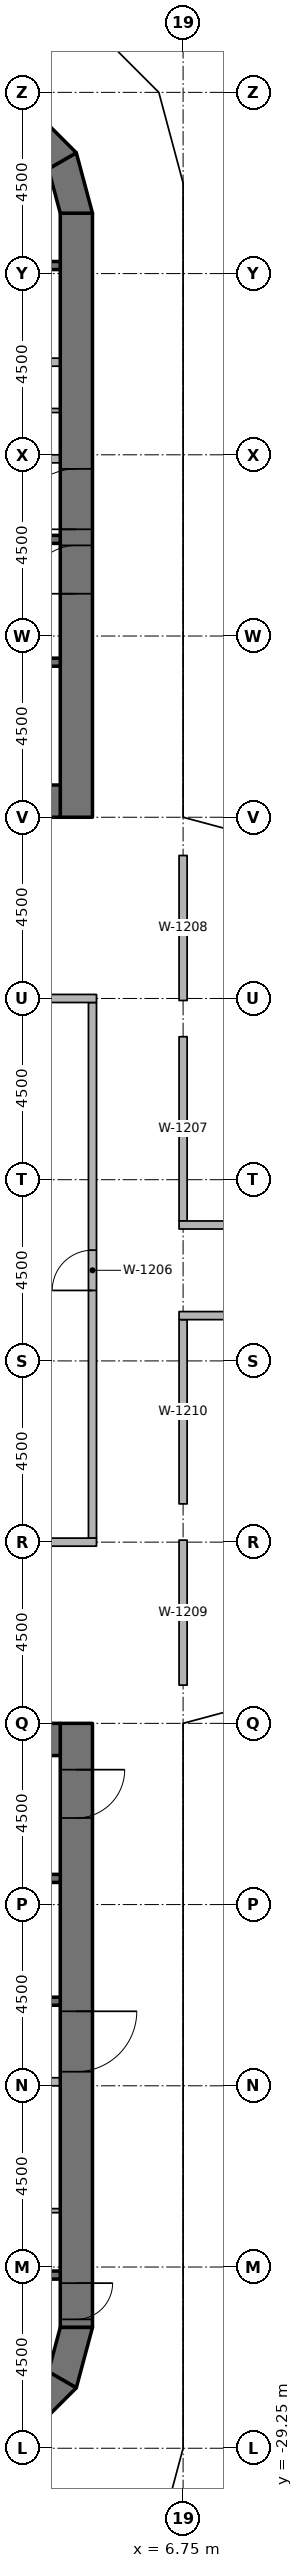
"""IFC4 building model, lengths in metres.
Left out: names, types, materials, properties, quantities, classifications, styles, units other than length and angle.
Written with IfcOpenShell. Run it as: python <this file> out.ifc"""

import sys

from ifc_helpers import new_model, si_unit, direction, frame, frame_2d, origin, origin_2d, place, context, subcontext, project, spatial, polyline, rectangle, outline, extrude, element, fill, save


model = new_model("IFC4")
c1 = context("Model", 3, precision=1e-05, world=origin(), true_north=direction((0.0, 1.0)))
c2 = subcontext(c1, "Body", "Model", "MODEL_VIEW")
j1 = project(units=[si_unit("LENGTHUNIT", "METRE"), si_unit("PLANEANGLEUNIT", "RADIAN")], contexts=[c1])
p1 = place(None, origin())
s1 = spatial("IfcSite", under=j1, at=p1, CompositionType="ELEMENT")
p2 = place(p1, origin())
s2 = spatial("IfcBuilding", under=s1, at=p2, CompositionType="ELEMENT")
p3 = place(p2, frame((0.0, 0.0, 128.4)))
s3 = spatial("IfcBuildingStorey", under=s2, at=p3, CompositionType="ELEMENT", Elevation=128.4)
for number, where, z_axis, x_axis in (
    (1, (6.25, -26.9, 0.0), (0.0, 0.0, 1.0), (1.0, 0.0, 0.0)),
    (2, (6.25, -24.65, 0.0), (0.0, 0.0, 1.0), (1.0, 0.0, 0.0)),
    (3, (6.25, -20.25, 0.0), (0.0, 0.0, 1.0), (1.0, 0.0, 0.0)),
    (4, (6.25, -15.75, 0.0), (0.0, 0.0, 1.0), (1.0, 0.0, 0.0)),
    (5, (6.25, -10.75, 0.0), (0.0, 0.0, 1.0), (1.0, 0.0, 0.0)),
    (6, (6.25, -6.25, 0.0), (0.0, 0.0, 1.0), (1.0, 0.0, 0.0)),
    (7, (6.25, 6.25, 0.0), (0.0, 0.0, 1.0), (1.0, 0.0, 0.0)),
    (8, (6.25, 10.75, 0.0), (0.0, 0.0, 1.0), (1.0, 0.0, 0.0)),
    (9, (6.25, 15.75, 0.0), (0.0, 0.0, 1.0), (1.0, 0.0, 0.0)),
    (10, (6.25, 20.25, 0.0), (0.0, 0.0, 1.0), (1.0, 0.0, 0.0)),
    (11, (6.25, 24.65, 0.0), (0.0, 0.0, 1.0), (1.0, 0.0, 0.0)),
    (12, (6.25, 26.7, 0.0), (0.0, 0.0, 1.0), (1.0, 0.0, 0.0)),
):
    element("IfcColumn", number, at=place(p3, frame(where, z_axis=z_axis, x_axis=x_axis)), inside=s3, PredefinedType="COLUMN", context=c2, shape_type="SweptSolid", body=[
        extrude(rectangle(XDim=0.9, YDim=0.9, at=origin_2d()), origin(), (0.0, 0.0, 1.0), 3.65),
    ])
p4 = place(p3, frame((4.1, 11.25, 0.0), z_axis=(0.0, 0.0, 1.0), x_axis=(0.0, 1.0, 0.0)))
e13 = element("IfcWall", 13, at=p4, inside=s3, PredefinedType="SHEAR", context=c2, shape_type="SweptSolid", body=[
    extrude(rectangle(XDim=15.0, YDim=0.8, at=frame_2d((7.5, 0.0))), origin(), (0.0, 0.0, 1.0), 3.8),
])
p5 = place(p4, frame((7.15, 0.0, 0.0)))
e14 = element("IfcOpeningElement", 14, at=p5, cuts=e13, PredefinedType="OPENING", context=c2, shape_type="SweptSolid", body=[
    extrude(rectangle(XDim=1.5, YDim=2.3, at=frame_2d((0.75, 1.15))), frame((0.0, 0.41, 0.0), z_axis=(0.0, -1.0, 0.0), x_axis=(1.0, 0.0, 0.0)), (0.0, 0.0, 1.0), 0.82),
])
p6 = place(p4, frame((5.55, 0.0, 0.0)))
e15 = element("IfcOpeningElement", 15, at=p6, cuts=e13, PredefinedType="OPENING", context=c2, shape_type="SweptSolid", body=[
    extrude(rectangle(XDim=1.2, YDim=2.1, at=frame_2d((0.6, 1.05))), frame((0.0, 0.41, 0.0), z_axis=(0.0, -1.0, 0.0), x_axis=(1.0, 0.0, 0.0)), (0.0, 0.0, 1.0), 0.82),
])
p7 = place(p3, frame((-3.7, 11.65, 0.0), z_axis=(0.0, 0.0, 1.0), x_axis=(1.0, 0.0, 0.0)))
e16 = element("IfcWall", 16, at=p7, inside=s3, PredefinedType="SHEAR", context=c2, shape_type="SweptSolid", body=[
    extrude(rectangle(XDim=7.4, YDim=0.8, at=frame_2d((3.7, 0.0))), origin(), (0.0, 0.0, 1.0), 3.8),
])
p8 = place(p3, origin())
e17 = element("IfcWall", 17, at=p8, inside=s3, PredefinedType="SHEAR", context=c2, shape_type="SweptSolid", body=[
    extrude(outline(polyline([(4.5, 26.25), (4.098, 27.75), (3.405, 27.35), (3.7, 26.25), (4.5, 26.25)])), origin(), (0.0, 0.0, 1.0), 3.8),
])
p9 = place(p3, origin())
e18 = element("IfcWall", 18, at=p9, inside=s3, PredefinedType="SHEAR", context=c2, shape_type="SweptSolid", body=[
    extrude(outline(polyline([(4.098, 27.75), (3.0, 28.848), (2.6, 28.155), (3.405, 27.35), (4.098, 27.75)])), origin(), (0.0, 0.0, 1.0), 3.8),
])
p10 = place(p3, frame((4.1, -11.25, 0.0), z_axis=(0.0, 0.0, 1.0), x_axis=(0.0, -1.0, 0.0)))
e19 = element("IfcWall", 19, at=p10, inside=s3, PredefinedType="SHEAR", context=c2, shape_type="SweptSolid", body=[
    extrude(rectangle(XDim=15.0, YDim=0.8, at=frame_2d((7.5, 0.0))), origin(), (0.0, 0.0, 1.0), 3.8),
])
p11 = place(p10, frame((7.15, 0.0, 0.0)))
e20 = element("IfcOpeningElement", 20, at=p11, cuts=e19, PredefinedType="OPENING", context=c2, shape_type="SweptSolid", body=[
    extrude(rectangle(XDim=1.5, YDim=2.3, at=frame_2d((0.75, 1.15))), frame((0.0, 0.41, 0.0), z_axis=(0.0, -1.0, 0.0), x_axis=(1.0, 0.0, 0.0)), (0.0, 0.0, 1.0), 0.82),
])
p12 = place(p10, frame((13.9, 0.0, 0.0)))
e21 = element("IfcOpeningElement", 21, at=p12, cuts=e19, PredefinedType="OPENING", context=c2, shape_type="SweptSolid", body=[
    extrude(rectangle(XDim=0.9, YDim=2.1, at=frame_2d((0.45, 1.05))), frame((0.0, 0.41, 0.0), z_axis=(0.0, -1.0, 0.0), x_axis=(1.0, 0.0, 0.0)), (0.0, 0.0, 1.0), 0.82),
])
p13 = place(p10, frame((1.15, 0.0, 0.0)))
e22 = element("IfcOpeningElement", 22, at=p13, cuts=e19, PredefinedType="OPENING", context=c2, shape_type="SweptSolid", body=[
    extrude(rectangle(XDim=1.2, YDim=2.1, at=frame_2d((0.6, 1.05))), frame((0.0, 0.41, 0.0), z_axis=(0.0, -1.0, 0.0), x_axis=(1.0, 0.0, 0.0)), (0.0, 0.0, 1.0), 0.82),
])
p14 = place(p3, frame((-3.7, -11.65, 0.0), z_axis=(0.0, 0.0, 1.0), x_axis=(1.0, 0.0, 0.0)))
e23 = element("IfcWall", 23, at=p14, inside=s3, PredefinedType="SHEAR", context=c2, shape_type="SweptSolid", body=[
    extrude(rectangle(XDim=7.4, YDim=0.8, at=frame_2d((3.7, 0.0))), origin(), (0.0, 0.0, 1.0), 3.8),
])
p15 = place(p3, origin())
e24 = element("IfcWall", 24, at=p15, inside=s3, PredefinedType="SHEAR", context=c2, shape_type="SweptSolid", body=[
    extrude(outline(polyline([(4.5, -26.25), (4.098, -27.75), (3.405, -27.35), (3.7, -26.25), (4.5, -26.25)])), origin(), (0.0, 0.0, 1.0), 3.8),
])
p16 = place(p3, origin())
e25 = element("IfcWall", 25, at=p16, inside=s3, PredefinedType="SHEAR", context=c2, shape_type="SweptSolid", body=[
    extrude(outline(polyline([(4.098, -27.75), (3.0, -28.848), (2.6, -28.155), (3.405, -27.35), (4.098, -27.75)])), origin(), (0.0, 0.0, 1.0), 3.8),
])
for number, where, z_axis, x_axis in (
    (26, (-3.7, 24.95, 0.0), (0.0, 0.0, 1.0), (1.0, 0.0, 0.0)),
    (27, (-3.7, 18.15, 0.0), (0.0, 0.0, 1.0), (1.0, 0.0, 0.0)),
    (28, (-3.7, 15.1, 0.0), (0.0, 0.0, 1.0), (1.0, 0.0, 0.0)),
):
    element("IfcWall", number, at=place(p3, frame(where, z_axis=z_axis, x_axis=x_axis)), inside=s3, PredefinedType="SHEAR", context=c2, shape_type="SweptSolid", body=[
        extrude(rectangle(XDim=7.4, YDim=0.2, at=frame_2d((3.7, 0.0))), origin(), (0.0, 0.0, 1.0), 3.65),
    ])
p17 = place(p3, frame((0.9, 20.15, 0.0), z_axis=(0.0, 0.0, 1.0), x_axis=(1.0, 0.0, 0.0)))
e29 = element("IfcWall", 29, at=p17, inside=s3, PredefinedType="PARTITIONING", context=c2, shape_type="SweptSolid", body=[
    extrude(rectangle(XDim=2.8, YDim=0.2, at=frame_2d((1.4, 0.0))), origin(), (0.0, 0.0, 1.0), 3.65),
])
p18 = place(p3, frame((1.1, 22.55, 0.0), z_axis=(0.0, 0.0, 1.0), x_axis=(1.0, 0.0, 0.0)))
e30 = element("IfcWall", 30, at=p18, inside=s3, PredefinedType="PARTITIONING", context=c2, shape_type="SweptSolid", body=[
    extrude(rectangle(XDim=2.6, YDim=0.2, at=frame_2d((1.3, 0.0))), origin(), (0.0, 0.0, 1.0), 3.65),
])
p19 = place(p3, frame((1.1, 21.35, 0.0), z_axis=(0.0, 0.0, 1.0), x_axis=(1.0, 0.0, 0.0)))
e31 = element("IfcWall", 31, at=p19, inside=s3, PredefinedType="PARTITIONING", context=c2, shape_type="SweptSolid", body=[
    extrude(rectangle(XDim=2.6, YDim=0.1, at=frame_2d((1.3, 0.0))), origin(), (0.0, 0.0, 1.0), 3.65),
])
for number, where, z_axis, x_axis in (
    (32, (3.7, -24.95, 0.0), (0.0, 0.0, 1.0), (-1.0, 0.0, 0.0)),
    (33, (3.7, -18.15, 0.0), (0.0, 0.0, 1.0), (-1.0, 0.0, 0.0)),
    (34, (3.7, -15.1, 0.0), (0.0, 0.0, 1.0), (-1.0, 0.0, 0.0)),
):
    element("IfcWall", number, at=place(p3, frame(where, z_axis=z_axis, x_axis=x_axis)), inside=s3, PredefinedType="SHEAR", context=c2, shape_type="SweptSolid", body=[
        extrude(rectangle(XDim=7.4, YDim=0.2, at=frame_2d((3.7, 0.0))), origin(), (0.0, 0.0, 1.0), 3.65),
    ])
p20 = place(p3, frame((3.7, -20.15, 0.0), z_axis=(0.0, 0.0, 1.0), x_axis=(-1.0, 0.0, 0.0)))
e35 = element("IfcWall", 35, at=p20, inside=s3, PredefinedType="PARTITIONING", context=c2, shape_type="SweptSolid", body=[
    extrude(rectangle(XDim=2.8, YDim=0.2, at=frame_2d((1.4, 0.0))), origin(), (0.0, 0.0, 1.0), 3.65),
])
p21 = place(p3, frame((3.7, -23.35, 0.0), z_axis=(0.0, 0.0, 1.0), x_axis=(-1.0, 0.0, 0.0)))
e36 = element("IfcWall", 36, at=p21, inside=s3, PredefinedType="PARTITIONING", context=c2, shape_type="SweptSolid", body=[
    extrude(rectangle(XDim=2.6, YDim=0.1, at=frame_2d((1.3, 0.0))), origin(), (0.0, 0.0, 1.0), 3.65),
])
p22 = place(p3, frame((4.5, -6.65, 0.0), z_axis=(0.0, 0.0, 1.0), x_axis=(0.0, 1.0, 0.0)))
e37 = element("IfcWall", 37, at=p22, inside=s3, PredefinedType="PARTITIONING", context=c2, shape_type="SweptSolid", body=[
    extrude(rectangle(XDim=13.3, YDim=0.2, at=frame_2d((6.65, 0.0))), origin(), (0.0, 0.0, 1.0), 2.738),
])
p23 = place(p22, frame((6.15, 0.0, 0.0)))
e38 = element("IfcOpeningElement", 38, at=p23, cuts=e37, PredefinedType="OPENING", context=c2, shape_type="SweptSolid", body=[
    extrude(rectangle(XDim=1.0, YDim=2.1, at=frame_2d((0.5, 1.05))), frame((0.0, 0.11, 0.0), z_axis=(0.0, -1.0, 0.0), x_axis=(1.0, 0.0, 0.0)), (0.0, 0.0, 1.0), 0.22),
])
p24 = place(p3, frame((6.75, 1.225, 0.0), z_axis=(0.0, 0.0, 1.0), x_axis=(0.0, 1.0, 0.0)))
e39 = element("IfcWall", 39, at=p24, inside=s3, PredefinedType="PARTITIONING", context=c2, shape_type="SweptSolid", body=[
    extrude(rectangle(XDim=4.575, YDim=0.2, at=frame_2d((2.288, 0.0))), origin(), (0.0, 0.0, 1.0), 2.738),
])
for number, where, z_axis, x_axis in (
    (40, (6.75, 6.7, 0.0), (0.0, 0.0, 1.0), (0.0, 1.0, 0.0)),
    (41, (6.75, -10.3, 0.0), (0.0, 0.0, 1.0), (0.0, 1.0, 0.0)),
):
    element("IfcWall", number, at=place(p3, frame(where, z_axis=z_axis, x_axis=x_axis)), inside=s3, PredefinedType="PARTITIONING", context=c2, shape_type="SweptSolid", body=[
        extrude(rectangle(XDim=3.6, YDim=0.2, at=frame_2d((1.8, 0.0))), origin(), (0.0, 0.0, 1.0), 2.738),
    ])
p25 = place(p3, frame((6.75, -5.8, 0.0), z_axis=(0.0, 0.0, 1.0), x_axis=(0.0, 1.0, 0.0)))
e42 = element("IfcWall", 42, at=p25, inside=s3, PredefinedType="PARTITIONING", context=c2, shape_type="SweptSolid", body=[
    extrude(rectangle(XDim=4.575, YDim=0.2, at=frame_2d((2.288, 0.0))), origin(), (0.0, 0.0, 1.0), 2.738),
])
for number, where, z_axis, x_axis in (
    (43, (-0.1, 6.75, 0.0), (0.0, 0.0, 1.0), (1.0, 0.0, 0.0)),
    (44, (-0.1, -6.75, 0.0), (0.0, 0.0, 1.0), (1.0, 0.0, 0.0)),
):
    element("IfcWall", number, at=place(p3, frame(where, z_axis=z_axis, x_axis=x_axis)), inside=s3, PredefinedType="PARTITIONING", context=c2, shape_type="SweptSolid", body=[
        extrude(rectangle(XDim=4.7, YDim=0.2, at=frame_2d((2.35, 0.0))), origin(), (0.0, 0.0, 1.0), 2.738),
    ])
p26 = place(p3, frame((6.65, 1.125, 0.0), z_axis=(0.0, 0.0, 1.0), x_axis=(1.0, 0.0, 0.0)))
e45 = element("IfcWall", 45, at=p26, inside=s3, PredefinedType="PARTITIONING", context=c2, shape_type="SweptSolid", body=[
    extrude(rectangle(XDim=4.7, YDim=0.2, at=frame_2d((2.35, 0.0))), origin(), (0.0, 0.0, 1.0), 2.738),
])
p27 = place(p26, frame((1.85, 0.0, 0.0)))
e46 = element("IfcOpeningElement", 46, at=p27, cuts=e45, PredefinedType="OPENING", context=c2, shape_type="SweptSolid", body=[
    extrude(rectangle(XDim=1.0, YDim=2.1, at=frame_2d((0.5, 1.05))), frame((0.0, 0.11, 0.0), z_axis=(0.0, -1.0, 0.0), x_axis=(1.0, 0.0, 0.0)), (0.0, 0.0, 1.0), 0.22),
])
p28 = place(p3, frame((11.35, -1.125, 0.0), z_axis=(0.0, 0.0, 1.0), x_axis=(-1.0, 0.0, 0.0)))
e47 = element("IfcWall", 47, at=p28, inside=s3, PredefinedType="PARTITIONING", context=c2, shape_type="SweptSolid", body=[
    extrude(rectangle(XDim=4.7, YDim=0.2, at=frame_2d((2.35, 0.0))), origin(), (0.0, 0.0, 1.0), 2.738),
])
p29 = place(p28, frame((1.85, 0.0, 0.0)))
e48 = element("IfcOpeningElement", 48, at=p29, cuts=e47, PredefinedType="OPENING", context=c2, shape_type="SweptSolid", body=[
    extrude(rectangle(XDim=1.0, YDim=2.1, at=frame_2d((0.5, 1.05))), frame((0.0, 0.11, 0.0), z_axis=(0.0, -1.0, 0.0), x_axis=(1.0, 0.0, 0.0)), (0.0, 0.0, 1.0), 0.22),
])
p30 = place(p5, origin())
e49 = element("IfcDoor", 49, at=p30, inside=s3, OperationType="DOUBLE_DOOR_SINGLE_SWING", PredefinedType="DOOR", context=c2, shape_type="SweptSolid", body=[
    extrude(rectangle(XDim=1.5, YDim=2.3, at=frame_2d((0.75, 1.15))), frame((0.0, 0.025, 0.0), z_axis=(0.0, -1.0, 0.0), x_axis=(1.0, 0.0, 0.0)), (0.0, 0.0, 1.0), 0.05),
])
fill(e14, e49)
p31 = place(p6, origin())
e50 = element("IfcDoor", 50, at=p31, inside=s3, OperationType="SINGLE_SWING_RIGHT", PredefinedType="DOOR", context=c2, shape_type="SweptSolid", body=[
    extrude(rectangle(XDim=1.2, YDim=2.1, at=frame_2d((0.6, 1.05))), frame((0.0, 0.025, 0.0), z_axis=(0.0, -1.0, 0.0), x_axis=(1.0, 0.0, 0.0)), (0.0, 0.0, 1.0), 0.05),
])
fill(e15, e50)
p32 = place(p11, origin())
e51 = element("IfcDoor", 51, at=p32, inside=s3, OperationType="DOUBLE_DOOR_SINGLE_SWING", PredefinedType="DOOR", context=c2, shape_type="SweptSolid", body=[
    extrude(rectangle(XDim=1.5, YDim=2.3, at=frame_2d((0.75, 1.15))), frame((0.0, 0.025, 0.0), z_axis=(0.0, -1.0, 0.0), x_axis=(1.0, 0.0, 0.0)), (0.0, 0.0, 1.0), 0.05),
])
fill(e20, e51)
p33 = place(p12, origin())
e52 = element("IfcDoor", 52, at=p33, inside=s3, OperationType="SINGLE_SWING_LEFT", PredefinedType="DOOR", context=c2, shape_type="SweptSolid", body=[
    extrude(rectangle(XDim=0.9, YDim=2.1, at=frame_2d((0.45, 1.05))), frame((0.0, 0.025, 0.0), z_axis=(0.0, -1.0, 0.0), x_axis=(1.0, 0.0, 0.0)), (0.0, 0.0, 1.0), 0.05),
])
fill(e21, e52)
p34 = place(p13, origin())
e53 = element("IfcDoor", 53, at=p34, inside=s3, OperationType="SINGLE_SWING_LEFT", PredefinedType="DOOR", context=c2, shape_type="SweptSolid", body=[
    extrude(rectangle(XDim=1.2, YDim=2.1, at=frame_2d((0.6, 1.05))), frame((0.0, 0.025, 0.0), z_axis=(0.0, -1.0, 0.0), x_axis=(1.0, 0.0, 0.0)), (0.0, 0.0, 1.0), 0.05),
])
fill(e22, e53)
p35 = place(p23, origin())
e54 = element("IfcDoor", 54, at=p35, inside=s3, OperationType="SINGLE_SWING_RIGHT", PredefinedType="DOOR", context=c2, shape_type="SweptSolid", body=[
    extrude(rectangle(XDim=1.0, YDim=2.1, at=frame_2d((0.5, 1.05))), frame((0.0, 0.025, 0.0), z_axis=(0.0, -1.0, 0.0), x_axis=(1.0, 0.0, 0.0)), (0.0, 0.0, 1.0), 0.05),
])
fill(e38, e54)
save(model, sys.argv[1])
